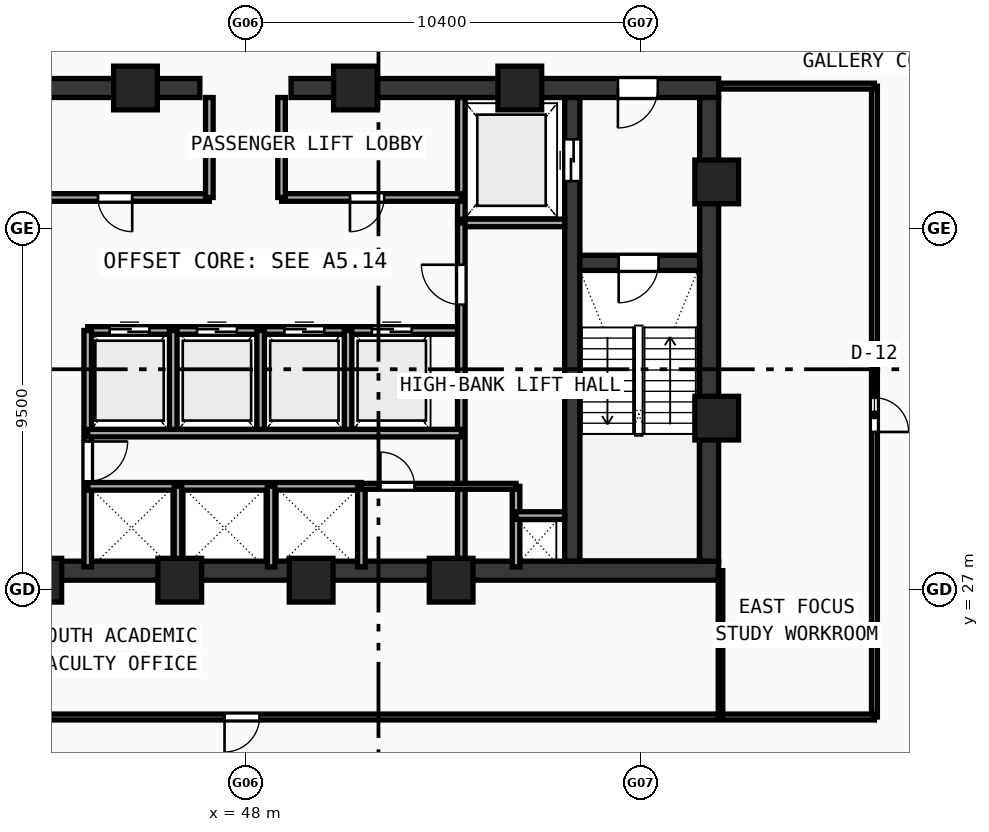
"""IFC4 building model, lengths in metres.
Left out: names, types, materials, properties, quantities, classifications, styles, units other than length and angle.
Written with IfcOpenShell. Run it as: python <this file> out.ifc"""

import sys

from ifc_helpers import new_model, si_unit, direction, frame, frame_2d, origin, origin_with_axes, origin_2d, place, context, subcontext, project, spatial, rectangle, hollow_rectangle, extrude, source, transform, mapped, element, fill, save


model = new_model("IFC4")
c1 = context("Model", 3, precision=1e-05, world=origin(), true_north=direction((0.0, 1.0)))
c2 = subcontext(c1, "Body", "Model", "MODEL_VIEW")
j1 = project(units=[si_unit("LENGTHUNIT", "METRE"), si_unit("PLANEANGLEUNIT", "RADIAN")], contexts=[c1])
p1 = place(None, origin())
s1 = spatial("IfcSite", under=j1, at=p1, CompositionType="ELEMENT")
p2 = place(p1, origin())
s2 = spatial("IfcBuilding", under=s1, at=p2, CompositionType="ELEMENT")
p3 = place(p2, frame((0.0, 0.0, 215.16)))
s3 = spatial("IfcBuildingStorey", under=s2, at=p3, CompositionType="ELEMENT", Elevation=215.16)
p4 = place(p3, frame((35.55, 27.5, 0.0), z_axis=(0.0, 0.0, 1.0), x_axis=(1.0, 0.0, 0.0)))
e1 = element("IfcWall", 1, at=p4, inside=s3, PredefinedType="SHEAR", context=c2, shape_type="SweptSolid", body=[
    extrude(rectangle(XDim=24.9, YDim=0.5, at=frame_2d((12.45, 0.0))), origin(), (0.0, 0.0, 1.0), 3.52),
])
p5 = place(p3, frame((35.55, 40.2, 0.0), z_axis=(0.0, 0.0, 1.0), x_axis=(1.0, 0.0, 0.0)))
e2 = element("IfcWall", 2, at=p5, inside=s3, PredefinedType="SHEAR", context=c2, shape_type="SweptSolid", body=[
    extrude(rectangle(XDim=11.25, YDim=0.5, at=frame_2d((5.625, 0.0))), origin(), (0.0, 0.0, 1.0), 3.52),
])
p6 = place(p5, frame((1.6, 0.0, 0.0)))
e3 = element("IfcOpeningElement", 3, at=p6, cuts=e2, PredefinedType="OPENING", context=c2, shape_type="SweptSolid", body=[
    extrude(rectangle(XDim=1.05, YDim=2.1, at=frame_2d((0.525, 1.05))), frame((0.0, 0.26, 0.0), z_axis=(0.0, -1.0, 0.0), x_axis=(1.0, 0.0, 0.0)), (0.0, 0.0, 1.0), 0.52),
])
p7 = place(p3, frame((49.2, 40.2, 0.0), z_axis=(0.0, 0.0, 1.0), x_axis=(1.0, 0.0, 0.0)))
e4 = element("IfcWall", 4, at=p7, inside=s3, PredefinedType="SHEAR", context=c2, shape_type="SweptSolid", body=[
    extrude(rectangle(XDim=11.25, YDim=0.5, at=frame_2d((5.625, 0.0))), origin(), (0.0, 0.0, 1.0), 3.52),
])
p8 = place(p7, frame((8.6, 0.0, 0.0)))
e5 = element("IfcOpeningElement", 5, at=p8, cuts=e4, PredefinedType="OPENING", context=c2, shape_type="SweptSolid", body=[
    extrude(rectangle(XDim=1.05, YDim=2.1, at=frame_2d((0.525, 1.05))), frame((0.0, 0.26, 0.0), z_axis=(0.0, -1.0, 0.0), x_axis=(1.0, 0.0, 0.0)), (0.0, 0.0, 1.0), 0.52),
])
p9 = place(p3, frame((60.2, 27.75, 0.0), z_axis=(0.0, 0.0, 1.0), x_axis=(0.0, 1.0, 0.0)))
e6 = element("IfcWall", 6, at=p9, inside=s3, PredefinedType="SHEAR", context=c2, shape_type="SweptSolid", body=[
    extrude(rectangle(XDim=12.2, YDim=0.5, at=frame_2d((6.1, 0.0))), origin(), (0.0, 0.0, 1.0), 3.52),
])
p10 = place(p3, frame((56.6, 27.75, 0.0), z_axis=(0.0, 0.0, 1.0), x_axis=(0.0, 1.0, 0.0)))
e7 = element("IfcWall", 7, at=p10, inside=s3, PredefinedType="SHEAR", context=c2, shape_type="SweptSolid", body=[
    extrude(rectangle(XDim=12.2, YDim=0.4, at=frame_2d((6.1, 0.0))), origin(), (0.0, 0.0, 1.0), 3.52),
])
p11 = place(p10, frame((10.0, 0.0, 0.0)))
e8 = element("IfcOpeningElement", 8, at=p11, cuts=e7, PredefinedType="OPENING", context=c2, shape_type="SweptSolid", body=[
    extrude(rectangle(XDim=1.1, YDim=2.1, at=frame_2d((0.55, 1.05))), frame((0.0, 0.21, 0.0), z_axis=(0.0, -1.0, 0.0), x_axis=(1.0, 0.0, 0.0)), (0.0, 0.0, 1.0), 0.42),
])
p12 = place(p3, frame((56.8, 35.6, 0.0), z_axis=(0.0, 0.0, 1.0), x_axis=(1.0, 0.0, 0.0)))
e9 = element("IfcWall", 9, at=p12, inside=s3, PredefinedType="SHEAR", context=c2, shape_type="SweptSolid", body=[
    extrude(rectangle(XDim=3.15, YDim=0.4, at=frame_2d((1.575, 0.0))), origin(), (0.0, 0.0, 1.0), 3.52),
])
p13 = place(p12, frame((1.02, 0.0, 0.0)))
e10 = element("IfcOpeningElement", 10, at=p13, cuts=e9, PredefinedType="OPENING", context=c2, shape_type="SweptSolid", body=[
    extrude(rectangle(XDim=1.05, YDim=2.1, at=frame_2d((0.525, 1.05))), frame((0.0, 0.21, 0.0), z_axis=(0.0, -1.0, 0.0), x_axis=(1.0, 0.0, 0.0)), (0.0, 0.0, 1.0), 0.42),
])
m1 = source(origin(), c2, "Body", "SweptSolid", [
    extrude(hollow_rectangle(XDim=1.15, YDim=1.15, WallThickness=0.048, at=origin_2d()), origin(), (0.0, 0.0, 1.0), 3.78),
])
for number, where, z_axis, x_axis in (
    (11, (42.588, 27.25, -0.26), (0.0, 0.0, 1.0), (1.0, 0.0, 0.0)),
    (12, (46.272, 27.25, -0.26), (0.0, 0.0, 1.0), (1.0, 0.0, 0.0)),
    (13, (49.729, 27.25, -0.26), (0.0, 0.0, 1.0), (1.0, 0.0, 0.0)),
    (14, (53.412, 27.25, -0.26), (0.0, 0.0, 1.0), (1.0, 0.0, 0.0)),
    (15, (60.4, 31.513, -0.26), (0.0, 0.0, 1.0), (1.0, 0.0, 0.0)),
    (16, (60.4, 37.729, -0.26), (0.0, 0.0, 1.0), (1.0, 0.0, 0.0)),
    (17, (55.219, 40.2, -0.26), (0.0, 0.0, 1.0), (1.0, 0.0, 0.0)),
    (18, (50.894, 40.2, -0.26), (0.0, 0.0, 1.0), (1.0, 0.0, 0.0)),
    (19, (45.106, 40.2, -0.26), (0.0, 0.0, 1.0), (1.0, 0.0, 0.0)),
):
    element("IfcColumn", number, at=place(p3, frame(where, z_axis=z_axis, x_axis=x_axis)), inside=s3, PredefinedType="COLUMN", context=c2, shape_type="MappedRepresentation", body=[
        mapped(m1, transform((0.0, 0.0, 0.0), scale=1.0)),
    ])
p14 = place(p3, frame((53.68, 36.65, 0.0), z_axis=(0.0, 0.0, 1.0), x_axis=(0.0, 1.0, 0.0)))
e20 = element("IfcWall", 20, at=p14, inside=s3, PredefinedType="SOLIDWALL", context=c2, shape_type="SweptSolid", body=[
    extrude(rectangle(XDim=3.3, YDim=0.2, at=frame_2d((1.65, 0.0))), origin(), (0.0, 0.0, 1.0), 3.52),
])
p15 = place(p3, frame((53.68, 36.65, 0.0), z_axis=(0.0, 0.0, 1.0), x_axis=(1.0, 0.0, 0.0)))
e21 = element("IfcWall", 21, at=p15, inside=s3, PredefinedType="SOLIDWALL", context=c2, shape_type="SweptSolid", body=[
    extrude(rectangle(XDim=2.72, YDim=0.2, at=frame_2d((1.36, 0.0))), origin(), (0.0, 0.0, 1.0), 3.52),
])
p16 = place(p3, frame((42.32, 37.32, 0.0), z_axis=(0.0, 0.0, 1.0), x_axis=(1.0, 0.0, 0.0)))
e22 = element("IfcWall", 22, at=p16, inside=s3, PredefinedType="SOLIDWALL", context=c2, shape_type="SweptSolid", body=[
    extrude(rectangle(XDim=4.73, YDim=0.2, at=frame_2d((2.365, 0.0))), origin(), (0.0, 0.0, 1.0), 3.52),
])
p17 = place(p16, frame((1.8, 0.0, 0.0)))
e23 = element("IfcOpeningElement", 23, at=p17, cuts=e22, PredefinedType="OPENING", context=c2, shape_type="SweptSolid", body=[
    extrude(rectangle(XDim=0.9, YDim=2.1, at=frame_2d((0.45, 1.05))), frame((0.0, 0.11, 0.0), z_axis=(0.0, -1.0, 0.0), x_axis=(1.0, 0.0, 0.0)), (0.0, 0.0, 1.0), 0.22),
])
p18 = place(p3, frame((48.95, 37.32, 0.0), z_axis=(0.0, 0.0, 1.0), x_axis=(1.0, 0.0, 0.0)))
e24 = element("IfcWall", 24, at=p18, inside=s3, PredefinedType="SOLIDWALL", context=c2, shape_type="SweptSolid", body=[
    extrude(rectangle(XDim=4.73, YDim=0.2, at=frame_2d((2.365, 0.0))), origin(), (0.0, 0.0, 1.0), 3.52),
])
p19 = place(p18, frame((1.8, 0.0, 0.0)))
e25 = element("IfcOpeningElement", 25, at=p19, cuts=e24, PredefinedType="OPENING", context=c2, shape_type="SweptSolid", body=[
    extrude(rectangle(XDim=0.9, YDim=2.1, at=frame_2d((0.45, 1.05))), frame((0.0, 0.11, 0.0), z_axis=(0.0, -1.0, 0.0), x_axis=(1.0, 0.0, 0.0)), (0.0, 0.0, 1.0), 0.22),
])
for number, where, z_axis, x_axis in (
    (26, (47.05, 37.32, 0.0), (0.0, 0.0, 1.0), (0.0, 1.0, 0.0)),
    (27, (48.95, 37.32, 0.0), (0.0, 0.0, 1.0), (0.0, 1.0, 0.0)),
):
    element("IfcWall", number, at=place(p3, frame(where, z_axis=z_axis, x_axis=x_axis)), inside=s3, PredefinedType="SOLIDWALL", context=c2, shape_type="SweptSolid", body=[
        extrude(rectangle(XDim=2.63, YDim=0.2, at=frame_2d((1.315, 0.0))), origin(), (0.0, 0.0, 1.0), 3.52),
    ])
p20 = place(p3, frame((43.85, 33.82, 0.0), z_axis=(0.0, 0.0, 1.0), x_axis=(1.0, 0.0, 0.0)))
e28 = element("IfcWall", 28, at=p20, inside=s3, PredefinedType="SOLIDWALL", context=c2, shape_type="SweptSolid", body=[
    extrude(rectangle(XDim=9.83, YDim=0.2, at=frame_2d((4.915, 0.0))), origin(), (0.0, 0.0, 1.0), 3.52),
])
p21 = place(p20, frame((0.575, 0.0, 0.0)))
e29 = element("IfcOpeningElement", 29, at=p21, cuts=e28, PredefinedType="OPENING", context=c2, shape_type="SweptSolid", body=[
    extrude(rectangle(XDim=1.05, YDim=2.1, at=frame_2d((0.525, 1.05))), frame((0.0, 0.11, 0.0), z_axis=(0.0, -1.0, 0.0), x_axis=(1.0, 0.0, 0.0)), (0.0, 0.0, 1.0), 0.22),
])
p22 = place(p20, frame((2.875, 0.0, 0.0)))
e30 = element("IfcOpeningElement", 30, at=p22, cuts=e28, PredefinedType="OPENING", context=c2, shape_type="SweptSolid", body=[
    extrude(rectangle(XDim=1.05, YDim=2.1, at=frame_2d((0.525, 1.05))), frame((0.0, 0.11, 0.0), z_axis=(0.0, -1.0, 0.0), x_axis=(1.0, 0.0, 0.0)), (0.0, 0.0, 1.0), 0.22),
])
p23 = place(p20, frame((5.175, 0.0, 0.0)))
e31 = element("IfcOpeningElement", 31, at=p23, cuts=e28, PredefinedType="OPENING", context=c2, shape_type="SweptSolid", body=[
    extrude(rectangle(XDim=1.05, YDim=2.1, at=frame_2d((0.525, 1.05))), frame((0.0, 0.11, 0.0), z_axis=(0.0, -1.0, 0.0), x_axis=(1.0, 0.0, 0.0)), (0.0, 0.0, 1.0), 0.22),
])
p24 = place(p20, frame((7.475, 0.0, 0.0)))
e32 = element("IfcOpeningElement", 32, at=p24, cuts=e28, PredefinedType="OPENING", context=c2, shape_type="SweptSolid", body=[
    extrude(rectangle(XDim=1.05, YDim=2.1, at=frame_2d((0.525, 1.05))), frame((0.0, 0.11, 0.0), z_axis=(0.0, -1.0, 0.0), x_axis=(1.0, 0.0, 0.0)), (0.0, 0.0, 1.0), 0.22),
])
p25 = place(p3, frame((43.85, 27.6, 0.0), z_axis=(0.0, 0.0, 1.0), x_axis=(0.0, 1.0, 0.0)))
e33 = element("IfcWall", 33, at=p25, inside=s3, PredefinedType="SOLIDWALL", context=c2, shape_type="SweptSolid", body=[
    extrude(rectangle(XDim=6.22, YDim=0.2, at=frame_2d((3.11, 0.0))), origin(), (0.0, 0.0, 1.0), 3.52),
])
p26 = place(p25, frame((2.25, 0.0, 0.0)))
e34 = element("IfcOpeningElement", 34, at=p26, cuts=e33, PredefinedType="OPENING", context=c2, shape_type="SweptSolid", body=[
    extrude(rectangle(XDim=1.05, YDim=2.1, at=frame_2d((0.525, 1.05))), frame((0.0, 0.11, 0.0), z_axis=(0.0, -1.0, 0.0), x_axis=(1.0, 0.0, 0.0)), (0.0, 0.0, 1.0), 0.22),
])
p27 = place(p3, frame((53.68, 27.6, 0.0), z_axis=(0.0, 0.0, 1.0), x_axis=(0.0, 1.0, 0.0)))
e35 = element("IfcWall", 35, at=p27, inside=s3, PredefinedType="SOLIDWALL", context=c2, shape_type="SweptSolid", body=[
    extrude(rectangle(XDim=9.05, YDim=0.2, at=frame_2d((4.525, 0.0))), origin(), (0.0, 0.0, 1.0), 3.52),
])
p28 = place(p27, frame((6.9, 0.0, 0.0)))
e36 = element("IfcOpeningElement", 36, at=p28, cuts=e35, PredefinedType="OPENING", context=c2, shape_type="SweptSolid", body=[
    extrude(rectangle(XDim=1.05, YDim=2.1, at=frame_2d((0.525, 1.05))), frame((0.0, 0.11, 0.0), z_axis=(0.0, -1.0, 0.0), x_axis=(1.0, 0.0, 0.0)), (0.0, 0.0, 1.0), 0.22),
])
for number, where, z_axis, x_axis in (
    (37, (46.1, 31.12, 0.0), (0.0, 0.0, 1.0), (0.0, 1.0, 0.0)),
    (38, (48.4, 31.12, 0.0), (0.0, 0.0, 1.0), (0.0, 1.0, 0.0)),
    (39, (50.7, 31.12, 0.0), (0.0, 0.0, 1.0), (0.0, 1.0, 0.0)),
):
    element("IfcWall", number, at=place(p3, frame(where, z_axis=z_axis, x_axis=x_axis)), inside=s3, PredefinedType="SOLIDWALL", context=c2, shape_type="SweptSolid", body=[
        extrude(rectangle(XDim=2.7, YDim=0.2, at=frame_2d((1.35, 0.0))), origin(), (0.0, 0.0, 1.0), 3.52),
    ])
p29 = place(p3, frame((43.85, 29.72, 0.0), z_axis=(0.0, 0.0, 1.0), x_axis=(1.0, 0.0, 0.0)))
e40 = element("IfcWall", 40, at=p29, inside=s3, PredefinedType="SOLIDWALL", context=c2, shape_type="SweptSolid", body=[
    extrude(rectangle(XDim=7.2, YDim=0.2, at=frame_2d((3.6, 0.0))), origin(), (0.0, 0.0, 1.0), 3.52),
])
p30 = place(p3, frame((51.05, 27.6, 0.0), z_axis=(0.0, 0.0, 1.0), x_axis=(0.0, 1.0, 0.0)))
e41 = element("IfcWall", 41, at=p30, inside=s3, PredefinedType="SOLIDWALL", context=c2, shape_type="SweptSolid", body=[
    extrude(rectangle(XDim=2.12, YDim=0.2, at=frame_2d((1.06, 0.0))), origin(), (0.0, 0.0, 1.0), 3.52),
])
p31 = place(p3, frame((43.85, 31.12, 0.0), z_axis=(0.0, 0.0, 1.0), x_axis=(1.0, 0.0, 0.0)))
e42 = element("IfcWall", 42, at=p31, inside=s3, PredefinedType="SOLIDWALL", context=c2, shape_type="SweptSolid", body=[
    extrude(rectangle(XDim=9.83, YDim=0.2, at=frame_2d((4.915, 0.0))), origin(), (0.0, 0.0, 1.0), 3.52),
])
for number, where, z_axis, x_axis in (
    (43, (46.225, 27.6, 0.0), (0.0, 0.0, 1.0), (0.0, 1.0, 0.0)),
    (44, (48.675, 27.6, 0.0), (0.0, 0.0, 1.0), (0.0, 1.0, 0.0)),
    (45, (55.12, 27.6, 0.0), (0.0, 0.0, 1.0), (0.0, 1.0, 0.0)),
):
    element("IfcWall", number, at=place(p3, frame(where, z_axis=z_axis, x_axis=x_axis)), inside=s3, PredefinedType="SOLIDWALL", context=c2, shape_type="SweptSolid", body=[
        extrude(rectangle(XDim=2.12, YDim=0.2, at=frame_2d((1.06, 0.0))), origin(), (0.0, 0.0, 1.0), 3.52),
    ])
p32 = place(p3, frame((55.12, 28.95, 0.0), z_axis=(0.0, 0.0, 1.0), x_axis=(1.0, 0.0, 0.0)))
e46 = element("IfcWall", 46, at=p32, inside=s3, PredefinedType="SOLIDWALL", context=c2, shape_type="SweptSolid", body=[
    extrude(rectangle(XDim=1.28, YDim=0.2, at=frame_2d((0.64, 0.0))), origin(), (0.0, 0.0, 1.0), 3.52),
])
p33 = place(p3, frame((51.05, 29.72, 0.0), z_axis=(0.0, 0.0, 1.0), x_axis=(1.0, 0.0, 0.0)))
e47 = element("IfcWall", 47, at=p33, inside=s3, PredefinedType="PARTITIONING", context=c2, shape_type="SweptSolid", body=[
    extrude(rectangle(XDim=4.07, YDim=0.155, at=frame_2d((2.035, 0.0))), origin(), (0.0, 0.0, 1.0), 3.52),
])
p34 = place(p33, frame((0.5, 0.0, 0.0)))
e48 = element("IfcOpeningElement", 48, at=p34, cuts=e47, PredefinedType="OPENING", context=c2, shape_type="SweptSolid", body=[
    extrude(rectangle(XDim=0.9, YDim=2.1, at=frame_2d((0.45, 1.05))), frame((0.0, 0.087, 0.0), z_axis=(0.0, -1.0, 0.0), x_axis=(1.0, 0.0, 0.0)), (0.0, 0.0, 1.0), 0.175),
])
p35 = place(p3, frame((64.55, 23.65, 0.0), z_axis=(0.0, 0.0, 1.0), x_axis=(0.0, 1.0, 0.0)))
e49 = element("IfcWall", 49, at=p35, inside=s3, PredefinedType="PARTITIONING", context=c2, shape_type="SweptSolid", body=[
    extrude(rectangle(XDim=16.6, YDim=0.155, at=frame_2d((8.3, 0.0))), origin(), (0.0, 0.0, 1.0), 2.87),
])
p36 = place(p35, frame((7.5, 0.0, 0.0)))
e50 = element("IfcOpeningElement", 50, at=p36, cuts=e49, PredefinedType="OPENING", context=c2, shape_type="SweptSolid", body=[
    extrude(rectangle(XDim=0.9, YDim=2.08, at=frame_2d((0.45, 1.04))), frame((0.0, 0.087, 0.0), z_axis=(0.0, -1.0, 0.0), x_axis=(1.0, 0.0, 0.0)), (0.0, 0.0, 1.0), 0.175),
])
p37 = place(p3, frame((31.45, 23.65, 0.0), z_axis=(0.0, 0.0, 1.0), x_axis=(1.0, 0.0, 0.0)))
e51 = element("IfcWall", 51, at=p37, inside=s3, PredefinedType="PARTITIONING", context=c2, shape_type="SweptSolid", body=[
    extrude(rectangle(XDim=33.1, YDim=0.155, at=frame_2d((16.55, 0.0))), origin(), (0.0, 0.0, 1.0), 2.87),
])
p38 = place(p37, frame((16.0, 0.0, 0.0)))
e52 = element("IfcOpeningElement", 52, at=p38, cuts=e51, PredefinedType="OPENING", context=c2, shape_type="SweptSolid", body=[
    extrude(rectangle(XDim=0.92, YDim=2.1, at=frame_2d((0.46, 1.05))), frame((0.0, 0.087, 0.0), z_axis=(0.0, -1.0, 0.0), x_axis=(1.0, 0.0, 0.0)), (0.0, 0.0, 1.0), 0.175),
])
p39 = place(p3, frame((60.5, 40.25, 0.0), z_axis=(0.0, 0.0, 1.0), x_axis=(1.0, 0.0, 0.0)))
e53 = element("IfcWall", 53, at=p39, inside=s3, PredefinedType="PARTITIONING", context=c2, shape_type="SweptSolid", body=[
    extrude(rectangle(XDim=4.05, YDim=0.155, at=frame_2d((2.025, 0.0))), origin(), (0.0, 0.0, 1.0), 3.52),
])
p40 = place(p3, frame((60.5, 23.65, 0.0), z_axis=(0.0, 0.0, 1.0), x_axis=(0.0, 1.0, 0.0)))
e54 = element("IfcWall", 54, at=p40, inside=s3, PredefinedType="PARTITIONING", context=c2, shape_type="SweptSolid", body=[
    extrude(rectangle(XDim=3.85, YDim=0.12, at=frame_2d((1.925, 0.0))), origin(), (0.0, 0.0, 1.0), 3.12),
])
m2 = source(origin(), c2, "Body", "SweptSolid", [
    extrude(rectangle(XDim=1.05, YDim=2.1, at=frame_2d((0.525, 1.05))), frame((0.0, 0.025, 0.0), z_axis=(0.0, -1.0, 0.0), x_axis=(1.0, 0.0, 0.0)), (0.0, 0.0, 1.0), 0.05),
])
p41 = place(p13, frame((1.05, 0.0, 0.0), z_axis=(0.0, 0.0, 1.0), x_axis=(-1.0, 0.0, 0.0)))
e55 = element("IfcDoor", 55, at=p41, inside=s3, OperationType="SINGLE_SWING_RIGHT", PredefinedType="DOOR", context=c2, shape_type="MappedRepresentation", body=[
    mapped(m2, transform((0.0, 0.0, 0.0), scale=1.0)),
])
fill(e10, e55)
p42 = place(p8, frame((1.05, 0.0, 0.0), z_axis=(0.0, 0.0, 1.0), x_axis=(-1.0, 0.0, 0.0)))
e56 = element("IfcDoor", 56, at=p42, inside=s3, OperationType="SINGLE_SWING_RIGHT", PredefinedType="DOOR", context=c2, shape_type="MappedRepresentation", body=[
    mapped(m2, transform((0.0, 0.0, 0.0), scale=1.0)),
])
fill(e5, e56)
m3 = source(origin(), c2, "Body", "SweptSolid", [
    extrude(rectangle(XDim=1.1, YDim=2.1, at=frame_2d((0.55, 1.05))), frame((0.0, 0.025, 0.0), z_axis=(0.0, -1.0, 0.0), x_axis=(1.0, 0.0, 0.0)), (0.0, 0.0, 1.0), 0.05),
])
p43 = place(p11, origin_with_axes())
e57 = element("IfcDoor", 57, at=p43, inside=s3, OperationType="DOUBLE_DOOR_SLIDING", PredefinedType="DOOR", context=c2, shape_type="MappedRepresentation", body=[
    mapped(m3, transform((0.0, 0.0, 0.0), scale=1.0)),
])
fill(e8, e57)
m4 = source(origin(), c2, "Body", "SweptSolid", [
    extrude(rectangle(XDim=0.9, YDim=2.1, at=frame_2d((0.45, 1.05))), frame((0.0, 0.025, 0.0), z_axis=(0.0, -1.0, 0.0), x_axis=(1.0, 0.0, 0.0)), (0.0, 0.0, 1.0), 0.05),
])
p44 = place(p17, frame((0.9, 0.0, 0.0), z_axis=(0.0, 0.0, 1.0), x_axis=(-1.0, 0.0, 0.0)))
e58 = element("IfcDoor", 58, at=p44, inside=s3, OperationType="SINGLE_SWING_LEFT", PredefinedType="DOOR", context=c2, shape_type="MappedRepresentation", body=[
    mapped(m4, transform((0.0, 0.0, 0.0), scale=1.0)),
])
fill(e23, e58)
p45 = place(p19, frame((0.9, 0.0, 0.0), z_axis=(0.0, 0.0, 1.0), x_axis=(-1.0, 0.0, 0.0)))
e59 = element("IfcDoor", 59, at=p45, inside=s3, OperationType="SINGLE_SWING_RIGHT", PredefinedType="DOOR", context=c2, shape_type="MappedRepresentation", body=[
    mapped(m4, transform((0.0, 0.0, 0.0), scale=1.0)),
])
fill(e25, e59)
p46 = place(p21, origin_with_axes())
e60 = element("IfcDoor", 60, at=p46, inside=s3, OperationType="DOUBLE_DOOR_SLIDING", PredefinedType="DOOR", context=c2, shape_type="MappedRepresentation", body=[
    mapped(m2, transform((0.0, 0.0, 0.0), scale=1.0)),
])
fill(e29, e60)
p47 = place(p22, origin_with_axes())
e61 = element("IfcDoor", 61, at=p47, inside=s3, OperationType="DOUBLE_DOOR_SLIDING", PredefinedType="DOOR", context=c2, shape_type="MappedRepresentation", body=[
    mapped(m2, transform((0.0, 0.0, 0.0), scale=1.0)),
])
fill(e30, e61)
p48 = place(p23, origin_with_axes())
e62 = element("IfcDoor", 62, at=p48, inside=s3, OperationType="DOUBLE_DOOR_SLIDING", PredefinedType="DOOR", context=c2, shape_type="MappedRepresentation", body=[
    mapped(m2, transform((0.0, 0.0, 0.0), scale=1.0)),
])
fill(e31, e62)
p49 = place(p24, origin_with_axes())
e63 = element("IfcDoor", 63, at=p49, inside=s3, OperationType="DOUBLE_DOOR_SLIDING", PredefinedType="DOOR", context=c2, shape_type="MappedRepresentation", body=[
    mapped(m2, transform((0.0, 0.0, 0.0), scale=1.0)),
])
fill(e32, e63)
p50 = place(p26, frame((1.05, 0.0, 0.0), z_axis=(0.0, 0.0, 1.0), x_axis=(-1.0, 0.0, 0.0)))
e64 = element("IfcDoor", 64, at=p50, inside=s3, OperationType="SINGLE_SWING_LEFT", PredefinedType="DOOR", context=c2, shape_type="MappedRepresentation", body=[
    mapped(m2, transform((0.0, 0.0, 0.0), scale=1.0)),
])
fill(e34, e64)
p51 = place(p28, origin_with_axes())
e65 = element("IfcDoor", 65, at=p51, inside=s3, OperationType="SINGLE_SWING_RIGHT", PredefinedType="DOOR", context=c2, shape_type="MappedRepresentation", body=[
    mapped(m2, transform((0.0, 0.0, 0.0), scale=1.0)),
])
fill(e36, e65)
p52 = place(p34, origin_with_axes())
e66 = element("IfcDoor", 66, at=p52, inside=s3, OperationType="SINGLE_SWING_LEFT", PredefinedType="DOOR", context=c2, shape_type="MappedRepresentation", body=[
    mapped(m4, transform((0.0, 0.0, 0.0), scale=1.0)),
])
fill(e48, e66)
m5 = source(origin(), c2, "Body", "SweptSolid", [
    extrude(rectangle(XDim=0.92, YDim=2.1, at=frame_2d((0.46, 1.05))), frame((0.0, 0.025, 0.0), z_axis=(0.0, -1.0, 0.0), x_axis=(1.0, 0.0, 0.0)), (0.0, 0.0, 1.0), 0.05),
])
p53 = place(p38, frame((0.92, 0.0, 0.0), z_axis=(0.0, 0.0, 1.0), x_axis=(-1.0, 0.0, 0.0)))
e67 = element("IfcDoor", 67, at=p53, inside=s3, OperationType="SINGLE_SWING_RIGHT", PredefinedType="DOOR", context=c2, shape_type="MappedRepresentation", body=[
    mapped(m5, transform((0.0, 0.0, 0.0), scale=1.0)),
])
fill(e52, e67)
m6 = source(origin(), c2, "Body", "SweptSolid", [
    extrude(rectangle(XDim=0.9, YDim=2.08, at=frame_2d((0.45, 1.04))), frame((0.0, 0.025, 0.0), z_axis=(0.0, -1.0, 0.0), x_axis=(1.0, 0.0, 0.0)), (0.0, 0.0, 1.0), 0.05),
])
p54 = place(p36, frame((0.9, 0.0, 0.0), z_axis=(0.0, 0.0, 1.0), x_axis=(-1.0, 0.0, 0.0)))
e68 = element("IfcDoor", 68, at=p54, inside=s3, OperationType="SINGLE_SWING_RIGHT", PredefinedType="DOOR", context=c2, shape_type="MappedRepresentation", body=[
    mapped(m6, transform((0.0, 0.0, 0.0), scale=1.0)),
])
fill(e50, e68)
save(model, sys.argv[1])
